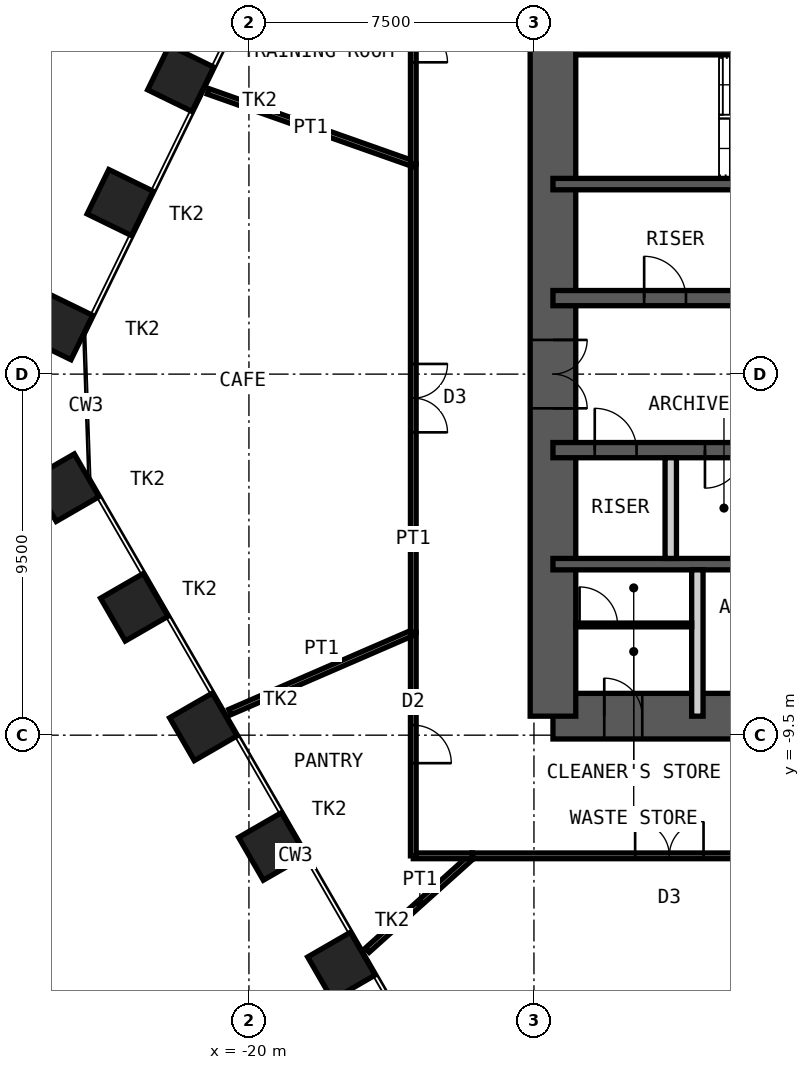
"""IFC4 building model, lengths in metres.
Left out: names, types, materials, properties, quantities, classifications, styles, units other than length and angle.
Written with IfcOpenShell. Run it as: python <this file> out.ifc"""

import sys

from ifc_helpers import new_model, si_unit, direction, frame, frame_2d, origin, origin_2d, place, context, subcontext, project, spatial, rectangle, hollow_rectangle, extrude, element, fill, save


model = new_model("IFC4")
c1 = context("Model", 3, precision=1e-05, world=origin(), true_north=direction((0.0, 1.0)))
c2 = subcontext(c1, "Body", "Model", "MODEL_VIEW")
j1 = project(units=[si_unit("LENGTHUNIT", "METRE"), si_unit("PLANEANGLEUNIT", "RADIAN")], contexts=[c1])
p1 = place(None, origin())
s1 = spatial("IfcSite", under=j1, at=p1, CompositionType="ELEMENT")
p2 = place(p1, origin())
s2 = spatial("IfcBuilding", under=s1, at=p2, CompositionType="ELEMENT")
p3 = place(p2, frame((0.0, 0.0, 180.4)))
s3 = spatial("IfcBuildingStorey", under=s2, at=p3, CompositionType="ELEMENT", Elevation=180.4)
for number, where, z_axis, x_axis in (
    (1, (-17.566, -15.574, 0.0), (0.0, 0.0, 1.0), (0.5, -0.866, 0.0)),
    (2, (-19.383, -12.428, 0.0), (0.0, 0.0, 1.0), (0.5, -0.866, 0.0)),
    (3, (-21.2, -9.281, 0.0), (0.0, 0.0, 1.0), (0.5, -0.866, 0.0)),
    (4, (-23.016, -6.134, 0.0), (0.0, 0.0, 1.0), (0.5, -0.866, 0.0)),
    (5, (-24.833, -2.988, 0.0), (0.0, 0.0, 1.0), (0.5, -0.866, 0.0)),
    (6, (-24.981, 1.248, 0.0), (0.0, 0.0, 1.0), (-0.438, -0.899, 0.0)),
    (7, (-23.388, 4.514, 0.0), (0.0, 0.0, 1.0), (-0.438, -0.899, 0.0)),
    (8, (-21.795, 7.78, 0.0), (0.0, 0.0, 1.0), (-0.438, -0.899, 0.0)),
):
    element("IfcColumn", number, at=place(p3, frame(where, z_axis=z_axis, x_axis=x_axis)), inside=s3, PredefinedType="COLUMN", context=c2, shape_type="SweptSolid", body=[
        extrude(hollow_rectangle(XDim=1.3, YDim=1.3, WallThickness=0.1, at=origin_2d()), origin(), (0.0, 0.0, 1.0), 4.2),
    ])
p4 = place(p3, frame((-12.0, 9.0, 0.0), z_axis=(0.0, 0.0, 1.0), x_axis=(1.0, 0.0, 0.0)))
e9 = element("IfcWall", 9, at=p4, inside=s3, PredefinedType="SHEAR", context=c2, shape_type="SweptSolid", body=[
    extrude(rectangle(XDim=24.0, YDim=1.2, at=frame_2d((12.0, 0.0))), origin(), (0.0, 0.0, 1.0), 4.2),
])
p5 = place(p4, frame((10.4, 0.0, 0.0)))
e10 = element("IfcOpeningElement", 10, at=p5, cuts=e9, PredefinedType="OPENING", context=c2, shape_type="SweptSolid", body=[
    extrude(rectangle(XDim=1.0, YDim=2.1, at=frame_2d((0.5, 1.05))), frame((0.0, 0.61, 0.0), z_axis=(0.0, -1.0, 0.0), x_axis=(1.0, 0.0, 0.0)), (0.0, 0.0, 1.0), 1.22),
])
p6 = place(p4, frame((17.6, 0.0, 0.0)))
e11 = element("IfcOpeningElement", 11, at=p6, cuts=e9, PredefinedType="OPENING", context=c2, shape_type="SweptSolid", body=[
    extrude(rectangle(XDim=0.9, YDim=2.1, at=frame_2d((0.45, 1.05))), frame((0.0, 0.61, 0.0), z_axis=(0.0, -1.0, 0.0), x_axis=(1.0, 0.0, 0.0)), (0.0, 0.0, 1.0), 1.22),
])
p7 = place(p4, frame((21.9, 0.0, 0.0)))
e12 = element("IfcOpeningElement", 12, at=p7, cuts=e9, PredefinedType="OPENING", context=c2, shape_type="SweptSolid", body=[
    extrude(rectangle(XDim=0.9, YDim=2.1, at=frame_2d((0.45, 1.05))), frame((0.0, 0.61, 0.0), z_axis=(0.0, -1.0, 0.0), x_axis=(1.0, 0.0, 0.0)), (0.0, 0.0, 1.0), 1.22),
])
p8 = place(p3, frame((-12.0, -9.0, 0.0), z_axis=(0.0, 0.0, 1.0), x_axis=(1.0, 0.0, 0.0)))
e13 = element("IfcWall", 13, at=p8, inside=s3, PredefinedType="SHEAR", context=c2, shape_type="SweptSolid", body=[
    extrude(rectangle(XDim=24.0, YDim=1.2, at=frame_2d((12.0, 0.0))), origin(), (0.0, 0.0, 1.0), 4.2),
])
p9 = place(p8, frame((1.35, 0.0, 0.0)))
e14 = element("IfcOpeningElement", 14, at=p9, cuts=e13, PredefinedType="OPENING", context=c2, shape_type="SweptSolid", body=[
    extrude(rectangle(XDim=1.0, YDim=2.1, at=frame_2d((0.5, 1.05))), frame((0.0, 0.61, 0.0), z_axis=(0.0, -1.0, 0.0), x_axis=(1.0, 0.0, 0.0)), (0.0, 0.0, 1.0), 1.22),
])
p10 = place(p8, frame((5.325, 0.0, 0.0)))
e15 = element("IfcOpeningElement", 15, at=p10, cuts=e13, PredefinedType="OPENING", context=c2, shape_type="SweptSolid", body=[
    extrude(rectangle(XDim=1.15, YDim=2.1, at=frame_2d((0.575, 1.05))), frame((0.0, 0.61, 0.0), z_axis=(0.0, -1.0, 0.0), x_axis=(1.0, 0.0, 0.0)), (0.0, 0.0, 1.0), 1.22),
])
p11 = place(p8, frame((12.6, 0.0, 0.0)))
e16 = element("IfcOpeningElement", 16, at=p11, cuts=e13, PredefinedType="OPENING", context=c2, shape_type="SweptSolid", body=[
    extrude(rectangle(XDim=1.0, YDim=2.1, at=frame_2d((0.5, 1.05))), frame((0.0, 0.61, 0.0), z_axis=(0.0, -1.0, 0.0), x_axis=(1.0, 0.0, 0.0)), (0.0, 0.0, 1.0), 1.22),
])
p12 = place(p3, frame((-12.0, -9.0, 0.0), z_axis=(0.0, 0.0, 1.0), x_axis=(0.0, 1.0, 0.0)))
e17 = element("IfcWall", 17, at=p12, inside=s3, PredefinedType="SHEAR", context=c2, shape_type="SweptSolid", body=[
    extrude(rectangle(XDim=18.0, YDim=1.2, at=frame_2d((9.0, 0.0))), origin(), (0.0, 0.0, 1.0), 4.2),
])
p13 = place(p12, frame((8.1, 0.0, 0.0)))
e18 = element("IfcOpeningElement", 18, at=p13, cuts=e17, PredefinedType="OPENING", context=c2, shape_type="SweptSolid", body=[
    extrude(rectangle(XDim=1.8, YDim=2.1, at=frame_2d((0.9, 1.05))), frame((0.0, 0.61, 0.0), z_axis=(0.0, -1.0, 0.0), x_axis=(1.0, 0.0, 0.0)), (0.0, 0.0, 1.0), 1.22),
])
p14 = place(p3, frame((-12.0, 5.0, 0.0), z_axis=(0.0, 0.0, 1.0), x_axis=(1.0, 0.0, 0.0)))
e19 = element("IfcWall", 19, at=p14, inside=s3, PredefinedType="SHEAR", context=c2, shape_type="SweptSolid", body=[
    extrude(rectangle(XDim=24.0, YDim=0.3, at=frame_2d((12.0, 0.0))), origin(), (0.0, 0.0, 1.0), 4.2),
])
p15 = place(p3, frame((-12.0, 2.0, 0.0), z_axis=(0.0, 0.0, 1.0), x_axis=(1.0, 0.0, 0.0)))
e20 = element("IfcWall", 20, at=p15, inside=s3, PredefinedType="SHEAR", context=c2, shape_type="SweptSolid", body=[
    extrude(rectangle(XDim=24.0, YDim=0.4, at=frame_2d((12.0, 0.0))), origin(), (0.0, 0.0, 1.0), 4.2),
])
p16 = place(p15, frame((2.4, 0.0, 0.0)))
e21 = element("IfcOpeningElement", 21, at=p16, cuts=e20, PredefinedType="OPENING", context=c2, shape_type="SweptSolid", body=[
    extrude(rectangle(XDim=1.1, YDim=2.1, at=frame_2d((0.55, 1.05))), frame((0.0, 0.21, 0.0), z_axis=(0.0, -1.0, 0.0), x_axis=(1.0, 0.0, 0.0)), (0.0, 0.0, 1.0), 0.42),
])
p17 = place(p15, frame((22.0, 0.0, 0.0)))
e22 = element("IfcOpeningElement", 22, at=p17, cuts=e20, PredefinedType="OPENING", context=c2, shape_type="SweptSolid", body=[
    extrude(rectangle(XDim=1.1, YDim=2.1, at=frame_2d((0.55, 1.05))), frame((0.0, 0.21, 0.0), z_axis=(0.0, -1.0, 0.0), x_axis=(1.0, 0.0, 0.0)), (0.0, 0.0, 1.0), 0.42),
])
p18 = place(p15, frame((10.15, 0.0, 0.0)))
e23 = element("IfcOpeningElement", 23, at=p18, cuts=e20, PredefinedType="OPENING", context=c2, shape_type="SweptSolid", body=[
    extrude(rectangle(XDim=1.0, YDim=2.1, at=frame_2d((0.5, 1.05))), frame((0.0, 0.21, 0.0), z_axis=(0.0, -1.0, 0.0), x_axis=(1.0, 0.0, 0.0)), (0.0, 0.0, 1.0), 0.42),
])
p19 = place(p15, frame((6.9, 0.0, 0.0)))
e24 = element("IfcOpeningElement", 24, at=p19, cuts=e20, PredefinedType="OPENING", context=c2, shape_type="SweptSolid", body=[
    extrude(rectangle(XDim=1.0, YDim=2.1, at=frame_2d((0.5, 1.05))), frame((0.0, 0.21, 0.0), z_axis=(0.0, -1.0, 0.0), x_axis=(1.0, 0.0, 0.0)), (0.0, 0.0, 1.0), 0.42),
])
p20 = place(p15, frame((13.35, 0.0, 0.0)))
e25 = element("IfcOpeningElement", 25, at=p20, cuts=e20, PredefinedType="OPENING", context=c2, shape_type="SweptSolid", body=[
    extrude(rectangle(XDim=1.1, YDim=2.4, at=frame_2d((0.55, 1.2))), frame((0.0, 0.21, 0.0), z_axis=(0.0, -1.0, 0.0), x_axis=(1.0, 0.0, 0.0)), (0.0, 0.0, 1.0), 0.42),
])
p21 = place(p15, frame((16.15, 0.0, 0.0)))
e26 = element("IfcOpeningElement", 26, at=p21, cuts=e20, PredefinedType="OPENING", context=c2, shape_type="SweptSolid", body=[
    extrude(rectangle(XDim=1.1, YDim=2.4, at=frame_2d((0.55, 1.2))), frame((0.0, 0.21, 0.0), z_axis=(0.0, -1.0, 0.0), x_axis=(1.0, 0.0, 0.0)), (0.0, 0.0, 1.0), 0.42),
])
p22 = place(p15, frame((18.95, 0.0, 0.0)))
e27 = element("IfcOpeningElement", 27, at=p22, cuts=e20, PredefinedType="OPENING", context=c2, shape_type="SweptSolid", body=[
    extrude(rectangle(XDim=1.1, YDim=2.4, at=frame_2d((0.55, 1.2))), frame((0.0, 0.21, 0.0), z_axis=(0.0, -1.0, 0.0), x_axis=(1.0, 0.0, 0.0)), (0.0, 0.0, 1.0), 0.42),
])
p23 = place(p3, frame((-12.0, -2.0, 0.0), z_axis=(0.0, 0.0, 1.0), x_axis=(1.0, 0.0, 0.0)))
e28 = element("IfcWall", 28, at=p23, inside=s3, PredefinedType="SHEAR", context=c2, shape_type="SweptSolid", body=[
    extrude(rectangle(XDim=24.0, YDim=0.4, at=frame_2d((12.0, 0.0))), origin(), (0.0, 0.0, 1.0), 4.2),
])
p24 = place(p23, frame((1.1, 0.0, 0.0)))
e29 = element("IfcOpeningElement", 29, at=p24, cuts=e28, PredefinedType="OPENING", context=c2, shape_type="SweptSolid", body=[
    extrude(rectangle(XDim=1.1, YDim=2.1, at=frame_2d((0.55, 1.05))), frame((0.0, 0.21, 0.0), z_axis=(0.0, -1.0, 0.0), x_axis=(1.0, 0.0, 0.0)), (0.0, 0.0, 1.0), 0.42),
])
p25 = place(p23, frame((13.55, 0.0, 0.0)))
e30 = element("IfcOpeningElement", 30, at=p25, cuts=e28, PredefinedType="OPENING", context=c2, shape_type="SweptSolid", body=[
    extrude(rectangle(XDim=1.1, YDim=2.1, at=frame_2d((0.55, 1.05))), frame((0.0, 0.21, 0.0), z_axis=(0.0, -1.0, 0.0), x_axis=(1.0, 0.0, 0.0)), (0.0, 0.0, 1.0), 0.42),
])
p26 = place(p23, frame((20.7, 0.0, 0.0)))
e31 = element("IfcOpeningElement", 31, at=p26, cuts=e28, PredefinedType="OPENING", context=c2, shape_type="SweptSolid", body=[
    extrude(rectangle(XDim=1.1, YDim=2.1, at=frame_2d((0.55, 1.05))), frame((0.0, 0.21, 0.0), z_axis=(0.0, -1.0, 0.0), x_axis=(1.0, 0.0, 0.0)), (0.0, 0.0, 1.0), 0.42),
])
p27 = place(p23, frame((4.0, 0.0, 0.0)))
e32 = element("IfcOpeningElement", 32, at=p27, cuts=e28, PredefinedType="OPENING", context=c2, shape_type="SweptSolid", body=[
    extrude(rectangle(XDim=1.0, YDim=2.1, at=frame_2d((0.5, 1.05))), frame((0.0, 0.21, 0.0), z_axis=(0.0, -1.0, 0.0), x_axis=(1.0, 0.0, 0.0)), (0.0, 0.0, 1.0), 0.42),
])
p28 = place(p23, frame((6.75, 0.0, 0.0)))
e33 = element("IfcOpeningElement", 33, at=p28, cuts=e28, PredefinedType="OPENING", context=c2, shape_type="SweptSolid", body=[
    extrude(rectangle(XDim=1.1, YDim=2.4, at=frame_2d((0.55, 1.2))), frame((0.0, 0.21, 0.0), z_axis=(0.0, -1.0, 0.0), x_axis=(1.0, 0.0, 0.0)), (0.0, 0.0, 1.0), 0.42),
])
p29 = place(p3, frame((-12.0, -5.0, 0.0), z_axis=(0.0, 0.0, 1.0), x_axis=(1.0, 0.0, 0.0)))
e34 = element("IfcWall", 34, at=p29, inside=s3, PredefinedType="SHEAR", context=c2, shape_type="SweptSolid", body=[
    extrude(rectangle(XDim=24.0, YDim=0.3, at=frame_2d((12.0, 0.0))), origin(), (0.0, 0.0, 1.0), 4.2),
])
p30 = place(p3, frame((-8.9, -4.85, 0.0), z_axis=(0.0, 0.0, 1.0), x_axis=(0.0, 1.0, 0.0)))
e35 = element("IfcWall", 35, at=p30, inside=s3, PredefinedType="PARTITIONING", context=c2, shape_type="SweptSolid", body=[
    extrude(rectangle(XDim=2.65, YDim=0.3, at=frame_2d((1.325, 0.0))), origin(), (0.0, 0.0, 1.0), 3.98),
])
p31 = place(p3, frame((-8.2, -9.0, 0.0), z_axis=(0.0, 0.0, 1.0), x_axis=(0.0, 1.0, 0.0)))
e36 = element("IfcWall", 36, at=p31, inside=s3, PredefinedType="PARTITIONING", context=c2, shape_type="SweptSolid", body=[
    extrude(rectangle(XDim=3.85, YDim=0.3, at=frame_2d((1.925, 0.0))), origin(), (0.0, 0.0, 1.0), 3.98),
])
p32 = place(p3, frame((-11.4, -6.6, 0.0), z_axis=(0.0, 0.0, 1.0), x_axis=(1.0, 0.0, 0.0)))
e37 = element("IfcWall", 37, at=p32, inside=s3, PredefinedType="PARTITIONING", context=c2, shape_type="SweptSolid", body=[
    extrude(rectangle(XDim=3.05, YDim=0.1, at=frame_2d((1.525, 0.0))), origin(), (0.0, 0.0, 1.0), 3.98),
])
p33 = place(p32, frame((0.1, 0.0, 0.0)))
e38 = element("IfcOpeningElement", 38, at=p33, cuts=e37, PredefinedType="OPENING", context=c2, shape_type="SweptSolid", body=[
    extrude(rectangle(XDim=1.0, YDim=2.4, at=frame_2d((0.5, 1.2))), frame((0.0, 0.06, 0.0), z_axis=(0.0, -1.0, 0.0), x_axis=(1.0, 0.0, 0.0)), (0.0, 0.0, 1.0), 0.12),
])
p34 = place(p3, frame((-3.755, -12.675, 0.0), z_axis=(0.0, 0.0, 1.0), x_axis=(-1.0, 0.0, 0.0)))
e39 = element("IfcWall", 39, at=p34, inside=s3, PredefinedType="PARTITIONING", context=c2, shape_type="SweptSolid", body=[
    extrude(rectangle(XDim=10.365, YDim=0.15, at=frame_2d((5.183, 0.0))), origin(), (0.0, 0.0, 1.0), 4.03),
])
p35 = place(p34, frame((4.282, 0.0, 0.0)))
e40 = element("IfcOpeningElement", 40, at=p35, cuts=e39, PredefinedType="OPENING", context=c2, shape_type="SweptSolid", body=[
    extrude(rectangle(XDim=1.8, YDim=2.4, at=frame_2d((0.9, 1.2))), frame((0.0, 0.085, 0.0), z_axis=(0.0, -1.0, 0.0), x_axis=(1.0, 0.0, 0.0)), (0.0, 0.0, 1.0), 0.17),
])
p36 = place(p3, frame((-16.885, -15.158, 0.0), z_axis=(0.0, 0.0, 1.0), x_axis=(0.744149337628, 0.668013295757, 0.0)))
e41 = element("IfcWall", 41, at=p36, inside=s3, PredefinedType="PARTITIONING", context=c2, shape_type="SweptSolid", body=[
    extrude(rectangle(XDim=3.717, YDim=0.15, at=frame_2d((1.858, 0.0))), origin(), (0.0, 0.0, 1.0), 2.93),
])
p37 = place(p3, frame((-14.12, -12.675, 0.0), z_axis=(0.0, 0.0, 1.0), x_axis=(-1.0, 0.0, 0.0)))
e42 = element("IfcWall", 42, at=p37, inside=s3, PredefinedType="PARTITIONING", context=c2, shape_type="SweptSolid", body=[
    extrude(rectangle(XDim=1.555, YDim=0.15, at=frame_2d((0.778, 0.0))), origin(), (0.0, 0.0, 1.0), 4.03),
])
p38 = place(p3, frame((-15.675, -12.675, 0.0), z_axis=(0.0, 0.0, 1.0), x_axis=(0.0, 1.0, 0.0)))
e43 = element("IfcWall", 43, at=p38, inside=s3, PredefinedType="PARTITIONING", context=c2, shape_type="SweptSolid", body=[
    extrude(rectangle(XDim=5.877, YDim=0.15, at=frame_2d((2.938, 0.0))), origin(), (0.0, 0.0, 1.0), 4.03),
])
p39 = place(p38, frame((2.438, 0.0, 0.0)))
e44 = element("IfcOpeningElement", 44, at=p39, cuts=e43, PredefinedType="OPENING", context=c2, shape_type="SweptSolid", body=[
    extrude(rectangle(XDim=1.0, YDim=2.4, at=frame_2d((0.5, 1.2))), frame((0.0, 0.085, 0.0), z_axis=(0.0, -1.0, 0.0), x_axis=(1.0, 0.0, 0.0)), (0.0, 0.0, 1.0), 0.17),
])
p40 = place(p3, frame((-20.502, -8.891, 0.0), z_axis=(0.0, 0.0, 1.0), x_axis=(0.917437074673, 0.397880904312, 0.0)))
e45 = element("IfcWall", 45, at=p40, inside=s3, PredefinedType="PARTITIONING", context=c2, shape_type="SweptSolid", body=[
    extrude(rectangle(XDim=5.261, YDim=0.15, at=frame_2d((2.63, 0.0))), origin(), (0.0, 0.0, 1.0), 2.93),
])
p41 = place(p3, frame((-15.675, -6.798, 0.0), z_axis=(0.0, 0.0, 1.0), x_axis=(0.0, 1.0, 0.0)))
e46 = element("IfcWall", 46, at=p41, inside=s3, PredefinedType="PARTITIONING", context=c2, shape_type="SweptSolid", body=[
    extrude(rectangle(XDim=12.332, YDim=0.15, at=frame_2d((6.166, 0.0))), origin(), (0.0, 0.0, 1.0), 4.03),
])
p42 = place(p41, frame((5.266, 0.0, 0.0)))
e47 = element("IfcOpeningElement", 47, at=p42, cuts=e46, PredefinedType="OPENING", context=c2, shape_type="SweptSolid", body=[
    extrude(rectangle(XDim=1.8, YDim=2.4, at=frame_2d((0.9, 1.2))), frame((0.0, 0.085, 0.0), z_axis=(0.0, -1.0, 0.0), x_axis=(1.0, 0.0, 0.0)), (0.0, 0.0, 1.0), 0.17),
])
p43 = place(p3, frame((-21.072, 7.439, 0.0), z_axis=(0.0, 0.0, 1.0), x_axis=(0.942965130718, -0.332891517241, 0.0)))
e48 = element("IfcWall", 48, at=p43, inside=s3, PredefinedType="PARTITIONING", context=c2, shape_type="SweptSolid", body=[
    extrude(rectangle(XDim=5.723, YDim=0.15, at=frame_2d((2.862, 0.0))), origin(), (0.0, 0.0, 1.0), 2.93),
])
p44 = place(p3, frame((-15.675, 5.534, 0.0), z_axis=(0.0, 0.0, 1.0), x_axis=(0.0, 1.0, 0.0)))
e49 = element("IfcWall", 49, at=p44, inside=s3, PredefinedType="PARTITIONING", context=c2, shape_type="SweptSolid", body=[
    extrude(rectangle(XDim=7.141, YDim=0.15, at=frame_2d((3.57, 0.0))), origin(), (0.0, 0.0, 1.0), 4.03),
])
p45 = place(p44, frame((2.67, 0.0, 0.0)))
e50 = element("IfcOpeningElement", 50, at=p45, cuts=e49, PredefinedType="OPENING", context=c2, shape_type="SweptSolid", body=[
    extrude(rectangle(XDim=1.8, YDim=2.4, at=frame_2d((0.9, 1.2))), frame((0.0, 0.085, 0.0), z_axis=(0.0, -1.0, 0.0), x_axis=(1.0, 0.0, 0.0)), (0.0, 0.0, 1.0), 0.17),
])
p46 = place(p9, origin())
e51 = element("IfcDoor", 51, at=p46, inside=s3, OperationType="SINGLE_SWING_RIGHT", PredefinedType="DOOR", context=c2, shape_type="SweptSolid", body=[
    extrude(rectangle(XDim=1.0, YDim=2.1, at=frame_2d((0.5, 1.05))), frame((0.0, 0.025, 0.0), z_axis=(0.0, -1.0, 0.0), x_axis=(1.0, 0.0, 0.0)), (0.0, 0.0, 1.0), 0.05),
])
fill(e14, e51)
p47 = place(p16, origin())
e52 = element("IfcDoor", 52, at=p47, inside=s3, OperationType="SINGLE_SWING_RIGHT", PredefinedType="DOOR", context=c2, shape_type="SweptSolid", body=[
    extrude(rectangle(XDim=1.1, YDim=2.1, at=frame_2d((0.55, 1.05))), frame((0.0, 0.025, 0.0), z_axis=(0.0, -1.0, 0.0), x_axis=(1.0, 0.0, 0.0)), (0.0, 0.0, 1.0), 0.05),
])
fill(e21, e52)
p48 = place(p24, origin())
e53 = element("IfcDoor", 53, at=p48, inside=s3, OperationType="SINGLE_SWING_RIGHT", PredefinedType="DOOR", context=c2, shape_type="SweptSolid", body=[
    extrude(rectangle(XDim=1.1, YDim=2.1, at=frame_2d((0.55, 1.05))), frame((0.0, 0.025, 0.0), z_axis=(0.0, -1.0, 0.0), x_axis=(1.0, 0.0, 0.0)), (0.0, 0.0, 1.0), 0.05),
])
fill(e29, e53)
p49 = place(p13, origin())
e54 = element("IfcDoor", 54, at=p49, inside=s3, OperationType="DOUBLE_DOOR_DOUBLE_SWING", PredefinedType="DOOR", context=c2, shape_type="SweptSolid", body=[
    extrude(rectangle(XDim=1.8, YDim=2.1, at=frame_2d((0.9, 1.05))), frame((0.0, 0.025, 0.0), z_axis=(0.0, -1.0, 0.0), x_axis=(1.0, 0.0, 0.0)), (0.0, 0.0, 1.0), 0.05),
])
fill(e18, e54)
p50 = place(p27, origin())
e55 = element("IfcDoor", 55, at=p50, inside=s3, OperationType="SINGLE_SWING_LEFT", PredefinedType="DOOR", context=c2, shape_type="SweptSolid", body=[
    extrude(rectangle(XDim=1.0, YDim=2.1, at=frame_2d((0.5, 1.05))), frame((0.0, 0.025, 0.0), z_axis=(0.0, -1.0, 0.0), x_axis=(1.0, 0.0, 0.0)), (0.0, 0.0, 1.0), 0.05),
])
fill(e32, e55)
p51 = place(p33, origin())
e56 = element("IfcDoor", 56, at=p51, inside=s3, OperationType="SINGLE_SWING_RIGHT", PredefinedType="DOOR", context=c2, shape_type="SweptSolid", body=[
    extrude(rectangle(XDim=1.0, YDim=2.4, at=frame_2d((0.5, 1.2))), frame((0.0, 0.025, 0.0), z_axis=(0.0, -1.0, 0.0), x_axis=(1.0, 0.0, 0.0)), (0.0, 0.0, 1.0), 0.05),
])
fill(e38, e56)
p52 = place(p35, origin())
e57 = element("IfcDoor", 57, at=p52, inside=s3, OperationType="DOUBLE_DOOR_DOUBLE_SWING", PredefinedType="DOOR", context=c2, shape_type="SweptSolid", body=[
    extrude(rectangle(XDim=1.8, YDim=2.4, at=frame_2d((0.9, 1.2))), frame((0.0, 0.025, 0.0), z_axis=(0.0, -1.0, 0.0), x_axis=(1.0, 0.0, 0.0)), (0.0, 0.0, 1.0), 0.05),
])
fill(e40, e57)
p53 = place(p39, origin())
e58 = element("IfcDoor", 58, at=p53, inside=s3, OperationType="SINGLE_SWING_LEFT", PredefinedType="DOOR", context=c2, shape_type="SweptSolid", body=[
    extrude(rectangle(XDim=1.0, YDim=2.4, at=frame_2d((0.5, 1.2))), frame((0.0, 0.025, 0.0), z_axis=(0.0, -1.0, 0.0), x_axis=(1.0, 0.0, 0.0)), (0.0, 0.0, 1.0), 0.05),
])
fill(e44, e58)
p54 = place(p42, origin())
e59 = element("IfcDoor", 59, at=p54, inside=s3, OperationType="DOUBLE_DOOR_DOUBLE_SWING", PredefinedType="DOOR", context=c2, shape_type="SweptSolid", body=[
    extrude(rectangle(XDim=1.8, YDim=2.4, at=frame_2d((0.9, 1.2))), frame((0.0, 0.025, 0.0), z_axis=(0.0, -1.0, 0.0), x_axis=(1.0, 0.0, 0.0)), (0.0, 0.0, 1.0), 0.05),
])
fill(e47, e59)
p55 = place(p45, origin())
e60 = element("IfcDoor", 60, at=p55, inside=s3, OperationType="DOUBLE_DOOR_DOUBLE_SWING", PredefinedType="DOOR", context=c2, shape_type="SweptSolid", body=[
    extrude(rectangle(XDim=1.8, YDim=2.4, at=frame_2d((0.9, 1.2))), frame((0.0, 0.025, 0.0), z_axis=(0.0, -1.0, 0.0), x_axis=(1.0, 0.0, 0.0)), (0.0, 0.0, 1.0), 0.05),
])
fill(e50, e60)
save(model, sys.argv[1])
